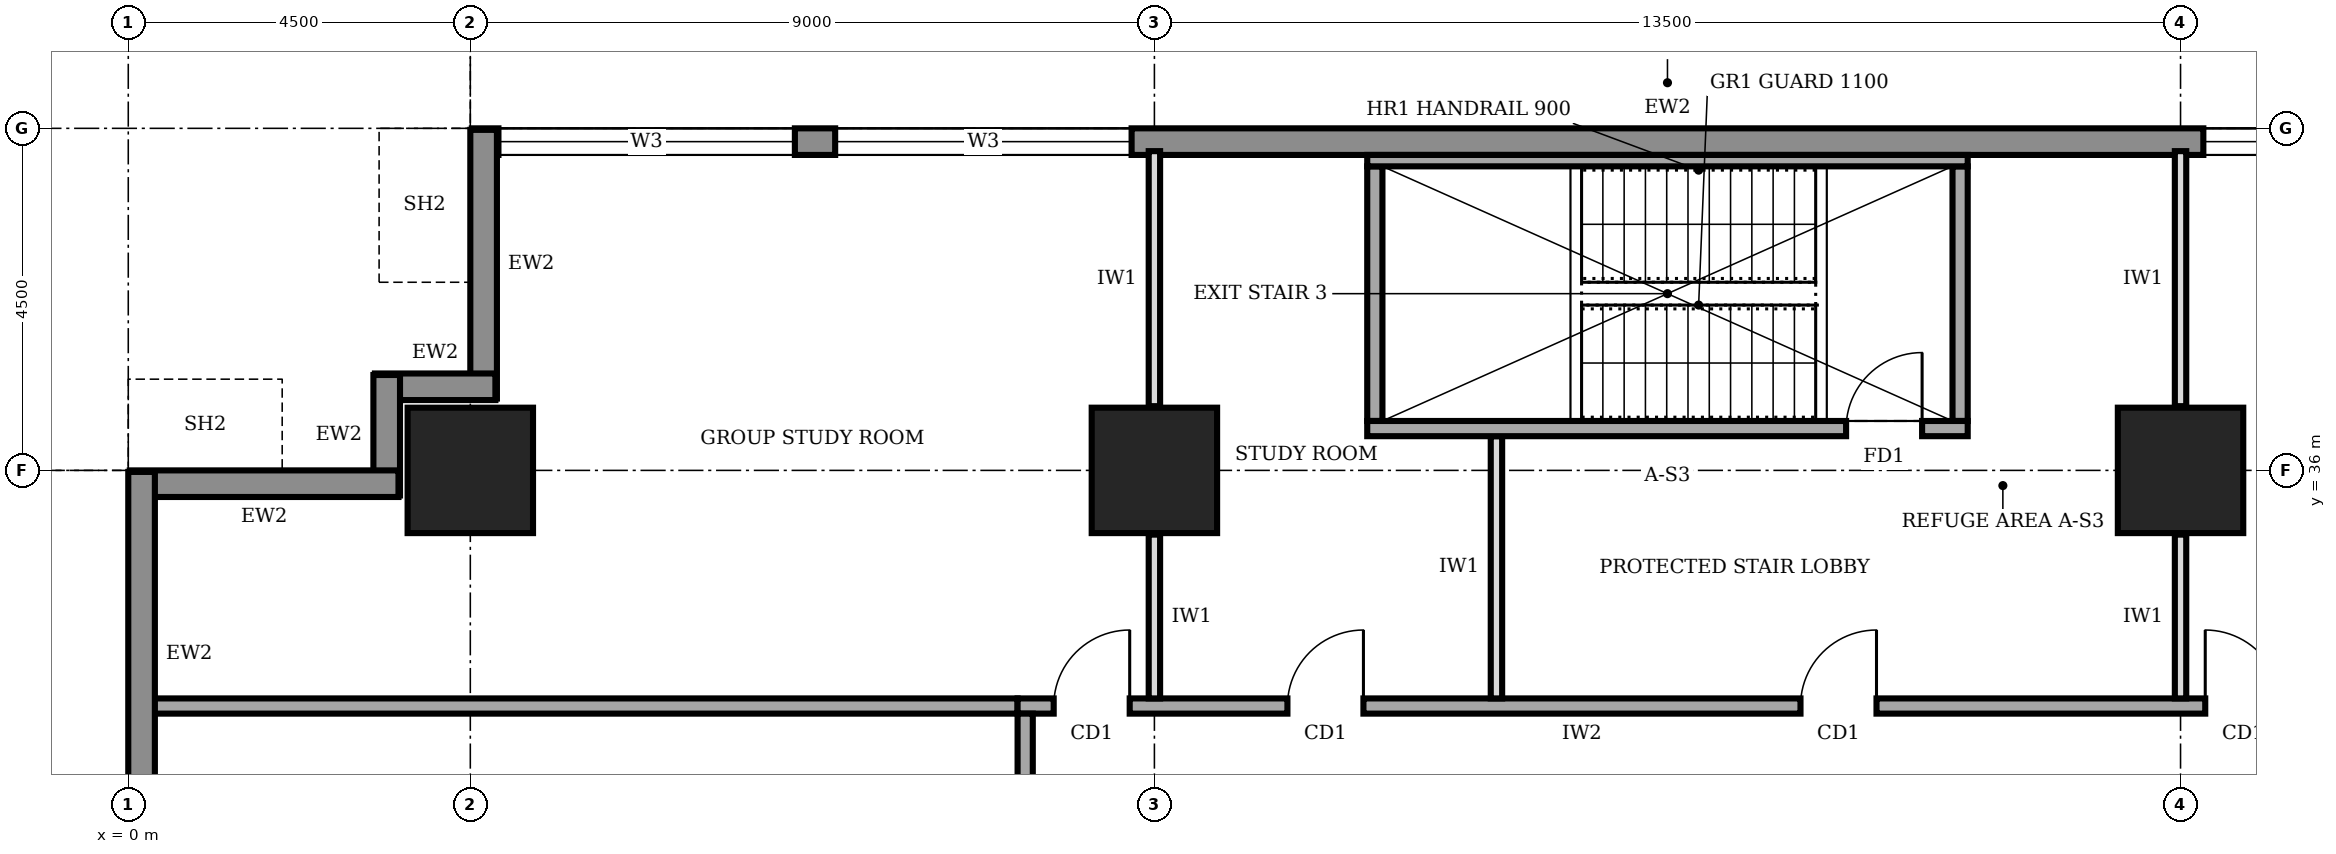
"""IFC4 building model, lengths in metres.
Left out: names, types, materials, properties, quantities, classifications, styles, units other than length and angle.
Written with IfcOpenShell. Run it as: python <this file> out.ifc"""

import sys

from ifc_helpers import new_model, si_unit, direction, frame, frame_2d, origin, origin_2d, place, context, subcontext, project, spatial, rectangle, extrude, element, fill, save


model = new_model("IFC4")
c1 = context("Model", 3, precision=1e-05, world=origin(), true_north=direction((0.0, 1.0)))
c2 = subcontext(c1, "Body", "Model", "MODEL_VIEW")
j1 = project(units=[si_unit("LENGTHUNIT", "METRE"), si_unit("PLANEANGLEUNIT", "RADIAN")], contexts=[c1])
p1 = place(None, origin())
s1 = spatial("IfcSite", under=j1, at=p1, CompositionType="ELEMENT")
p2 = place(p1, origin())
s2 = spatial("IfcBuilding", under=s1, at=p2, CompositionType="ELEMENT")
p3 = place(p2, frame((0.0, 0.0, 189.0)))
s3 = spatial("IfcBuildingStorey", under=s2, at=p3, CompositionType="ELEMENT", Elevation=189.0)
for number, where, z_axis, x_axis in (
    (1, (4.5, 36.0, 0.0), (0.0, 0.0, 1.0), (1.0, 0.0, 0.0)),
    (2, (13.5, 36.0, 0.0), (0.0, 0.0, 1.0), (1.0, 0.0, 0.0)),
    (3, (27.0, 36.0, 0.0), (0.0, 0.0, 1.0), (1.0, 0.0, 0.0)),
):
    element("IfcColumn", number, at=place(p3, frame(where, z_axis=z_axis, x_axis=x_axis)), inside=s3, PredefinedType="COLUMN", context=c2, shape_type="SweptSolid", body=[
        extrude(rectangle(XDim=1.65, YDim=1.65, at=origin_2d()), origin(), (0.0, 0.0, 1.0), 4.0),
    ])
p4 = place(p3, frame((35.98, 40.325, 0.0), z_axis=(0.0, 0.0, 1.0), x_axis=(-1.0, 0.0, 0.0)))
e4 = element("IfcWall", 4, at=p4, inside=s3, PredefinedType="STANDARD", context=c2, shape_type="SweptSolid", body=[
    extrude(rectangle(XDim=31.46, YDim=0.35, at=frame_2d((15.73, 0.0))), origin(), (0.0, 0.0, 1.0), 3.75),
])
p5 = place(p4, frame((27.21, 0.0, 0.95)))
e5 = element("IfcOpeningElement", 5, at=p5, cuts=e4, PredefinedType="OPENING", context=c2, shape_type="SweptSolid", body=[
    extrude(rectangle(XDim=3.9, YDim=1.8, at=frame_2d((1.95, 0.9))), frame((0.0, 0.185, 0.0), z_axis=(0.0, -1.0, 0.0), x_axis=(1.0, 0.0, 0.0)), (0.0, 0.0, 1.0), 0.37),
])
p6 = place(p4, frame((22.78, 0.0, 0.95)))
e6 = element("IfcOpeningElement", 6, at=p6, cuts=e4, PredefinedType="OPENING", context=c2, shape_type="SweptSolid", body=[
    extrude(rectangle(XDim=3.9, YDim=1.8, at=frame_2d((1.95, 0.9))), frame((0.0, 0.185, 0.0), z_axis=(0.0, -1.0, 0.0), x_axis=(1.0, 0.0, 0.0)), (0.0, 0.0, 1.0), 0.37),
])
p7 = place(p4, frame((4.78, 0.0, 0.95)))
e7 = element("IfcOpeningElement", 7, at=p7, cuts=e4, PredefinedType="OPENING", context=c2, shape_type="SweptSolid", body=[
    extrude(rectangle(XDim=3.9, YDim=1.8, at=frame_2d((1.95, 0.9))), frame((0.0, 0.185, 0.0), z_axis=(0.0, -1.0, 0.0), x_axis=(1.0, 0.0, 0.0)), (0.0, 0.0, 1.0), 0.37),
])
p8 = place(p3, frame((4.675, 40.48, 0.0), z_axis=(0.0, 0.0, 1.0), x_axis=(0.0, -1.0, 0.0)))
e8 = element("IfcWall", 8, at=p8, inside=s3, PredefinedType="STANDARD", context=c2, shape_type="SweptSolid", body=[
    extrude(rectangle(XDim=3.535, YDim=0.35, at=frame_2d((1.768, 0.0))), origin(), (0.0, 0.0, 1.0), 2.85),
])
for number, where, z_axis, x_axis in (
    (9, (4.83, 37.1, 0.0), (0.0, 0.0, 1.0), (-1.0, 0.0, 0.0)),
    (10, (3.4, 37.255, 0.0), (0.0, 0.0, 1.0), (0.0, -1.0, 0.0)),
):
    element("IfcWall", number, at=place(p3, frame(where, z_axis=z_axis, x_axis=x_axis)), inside=s3, PredefinedType="STANDARD", context=c2, shape_type="SweptSolid", body=[
        extrude(rectangle(XDim=1.585, YDim=0.35, at=frame_2d((0.792, 0.0))), origin(), (0.0, 0.0, 1.0), 3.75),
    ])
p9 = place(p3, frame((3.555, 35.825, 0.0), z_axis=(0.0, 0.0, 1.0), x_axis=(-1.0, 0.0, 0.0)))
e11 = element("IfcWall", 11, at=p9, inside=s3, PredefinedType="STANDARD", context=c2, shape_type="SweptSolid", body=[
    extrude(rectangle(XDim=3.535, YDim=0.35, at=frame_2d((1.768, 0.0))), origin(), (0.0, 0.0, 1.0), 2.85),
])
p10 = place(p3, frame((0.175, 35.98, 0.0), z_axis=(0.0, 0.0, 1.0), x_axis=(0.0, -1.0, 0.0)))
e12 = element("IfcWall", 12, at=p10, inside=s3, PredefinedType="STANDARD", context=c2, shape_type="SweptSolid", body=[
    extrude(rectangle(XDim=31.46, YDim=0.35, at=frame_2d((15.73, 0.0))), origin(), (0.0, 0.0, 1.0), 3.75),
])
p11 = place(p10, frame((27.21, 0.0, 0.95)))
e13 = element("IfcOpeningElement", 13, at=p11, cuts=e12, PredefinedType="OPENING", context=c2, shape_type="SweptSolid", body=[
    extrude(rectangle(XDim=3.9, YDim=1.8, at=frame_2d((1.95, 0.9))), frame((0.0, 0.185, 0.0), z_axis=(0.0, -1.0, 0.0), x_axis=(1.0, 0.0, 0.0)), (0.0, 0.0, 1.0), 0.37),
])
p12 = place(p10, frame((22.78, 0.0, 0.95)))
e14 = element("IfcOpeningElement", 14, at=p12, cuts=e12, PredefinedType="OPENING", context=c2, shape_type="SweptSolid", body=[
    extrude(rectangle(XDim=3.9, YDim=1.8, at=frame_2d((1.95, 0.9))), frame((0.0, 0.185, 0.0), z_axis=(0.0, -1.0, 0.0), x_axis=(1.0, 0.0, 0.0)), (0.0, 0.0, 1.0), 0.37),
])
p13 = place(p10, frame((18.28, 0.0, 0.95)))
e15 = element("IfcOpeningElement", 15, at=p13, cuts=e12, PredefinedType="OPENING", context=c2, shape_type="SweptSolid", body=[
    extrude(rectangle(XDim=3.9, YDim=1.8, at=frame_2d((1.95, 0.9))), frame((0.0, 0.185, 0.0), z_axis=(0.0, -1.0, 0.0), x_axis=(1.0, 0.0, 0.0)), (0.0, 0.0, 1.0), 0.37),
])
p14 = place(p10, frame((13.78, 0.0, 0.95)))
e16 = element("IfcOpeningElement", 16, at=p14, cuts=e12, PredefinedType="OPENING", context=c2, shape_type="SweptSolid", body=[
    extrude(rectangle(XDim=3.9, YDim=1.8, at=frame_2d((1.95, 0.9))), frame((0.0, 0.185, 0.0), z_axis=(0.0, -1.0, 0.0), x_axis=(1.0, 0.0, 0.0)), (0.0, 0.0, 1.0), 0.37),
])
p15 = place(p10, frame((9.28, 0.0, 0.95)))
e17 = element("IfcOpeningElement", 17, at=p15, cuts=e12, PredefinedType="OPENING", context=c2, shape_type="SweptSolid", body=[
    extrude(rectangle(XDim=3.9, YDim=1.8, at=frame_2d((1.95, 0.9))), frame((0.0, 0.185, 0.0), z_axis=(0.0, -1.0, 0.0), x_axis=(1.0, 0.0, 0.0)), (0.0, 0.0, 1.0), 0.37),
])
p16 = place(p10, frame((4.78, 0.0, 0.95)))
e18 = element("IfcOpeningElement", 18, at=p16, cuts=e12, PredefinedType="OPENING", context=c2, shape_type="SweptSolid", body=[
    extrude(rectangle(XDim=3.9, YDim=1.8, at=frame_2d((1.95, 0.9))), frame((0.0, 0.185, 0.0), z_axis=(0.0, -1.0, 0.0), x_axis=(1.0, 0.0, 0.0)), (0.0, 0.0, 1.0), 0.37),
])
p17 = place(p3, frame((28.6, 32.9, 0.0), z_axis=(0.0, 0.0, 1.0), x_axis=(-1.0, 0.0, 0.0)))
e19 = element("IfcWall", 19, at=p17, inside=s3, PredefinedType="SOLIDWALL", context=c2, shape_type="SweptSolid", body=[
    extrude(rectangle(XDim=16.9, YDim=0.2, at=frame_2d((8.45, 0.0))), origin(), (0.0, 0.0, 1.0), 3.75),
])
p18 = place(p17, frame((15.425, 0.0, 0.0)))
e20 = element("IfcOpeningElement", 20, at=p18, cuts=e19, PredefinedType="OPENING", context=c2, shape_type="SweptSolid", body=[
    extrude(rectangle(XDim=1.0, YDim=2.1, at=frame_2d((0.5, 1.05))), frame((0.0, 0.11, 0.0), z_axis=(0.0, -1.0, 0.0), x_axis=(1.0, 0.0, 0.0)), (0.0, 0.0, 1.0), 0.22),
])
p19 = place(p17, frame((12.35, 0.0, 0.0)))
e21 = element("IfcOpeningElement", 21, at=p19, cuts=e19, PredefinedType="OPENING", context=c2, shape_type="SweptSolid", body=[
    extrude(rectangle(XDim=1.0, YDim=2.1, at=frame_2d((0.5, 1.05))), frame((0.0, 0.11, 0.0), z_axis=(0.0, -1.0, 0.0), x_axis=(1.0, 0.0, 0.0)), (0.0, 0.0, 1.0), 0.22),
])
p20 = place(p17, frame((5.6, 0.0, 0.0)))
e22 = element("IfcOpeningElement", 22, at=p20, cuts=e19, PredefinedType="OPENING", context=c2, shape_type="SweptSolid", body=[
    extrude(rectangle(XDim=1.0, YDim=2.1, at=frame_2d((0.5, 1.05))), frame((0.0, 0.11, 0.0), z_axis=(0.0, -1.0, 0.0), x_axis=(1.0, 0.0, 0.0)), (0.0, 0.0, 1.0), 0.22),
])
p21 = place(p17, frame((0.275, 0.0, 0.0)))
e23 = element("IfcOpeningElement", 23, at=p21, cuts=e19, PredefinedType="OPENING", context=c2, shape_type="SweptSolid", body=[
    extrude(rectangle(XDim=1.0, YDim=2.1, at=frame_2d((0.5, 1.05))), frame((0.0, 0.11, 0.0), z_axis=(0.0, -1.0, 0.0), x_axis=(1.0, 0.0, 0.0)), (0.0, 0.0, 1.0), 0.22),
])
p22 = place(p3, frame((11.8, 32.8, 0.0), z_axis=(0.0, 0.0, 1.0), x_axis=(0.0, -1.0, 0.0)))
e24 = element("IfcWall", 24, at=p22, inside=s3, PredefinedType="SOLIDWALL", context=c2, shape_type="SweptSolid", body=[
    extrude(rectangle(XDim=25.3, YDim=0.2, at=frame_2d((12.65, 0.0))), origin(), (0.0, 0.0, 1.0), 3.75),
])
p23 = place(p22, frame((21.8, 0.0, 0.0)))
e25 = element("IfcOpeningElement", 25, at=p23, cuts=e24, PredefinedType="OPENING", context=c2, shape_type="SweptSolid", body=[
    extrude(rectangle(XDim=1.0, YDim=2.1, at=frame_2d((0.5, 1.05))), frame((0.0, 0.11, 0.0), z_axis=(0.0, -1.0, 0.0), x_axis=(1.0, 0.0, 0.0)), (0.0, 0.0, 1.0), 0.22),
])
p24 = place(p22, frame((17.15, 0.0, 0.0)))
e26 = element("IfcOpeningElement", 26, at=p24, cuts=e24, PredefinedType="OPENING", context=c2, shape_type="SweptSolid", body=[
    extrude(rectangle(XDim=0.9, YDim=2.1, at=frame_2d((0.45, 1.05))), frame((0.0, 0.11, 0.0), z_axis=(0.0, -1.0, 0.0), x_axis=(1.0, 0.0, 0.0)), (0.0, 0.0, 1.0), 0.22),
])
p25 = place(p22, frame((12.35, 0.0, 0.0)))
e27 = element("IfcOpeningElement", 27, at=p25, cuts=e24, PredefinedType="OPENING", context=c2, shape_type="SweptSolid", body=[
    extrude(rectangle(XDim=0.9, YDim=2.1, at=frame_2d((0.45, 1.05))), frame((0.0, 0.11, 0.0), z_axis=(0.0, -1.0, 0.0), x_axis=(1.0, 0.0, 0.0)), (0.0, 0.0, 1.0), 0.22),
])
p26 = place(p22, frame((9.3, 0.0, 0.0)))
e28 = element("IfcOpeningElement", 28, at=p26, cuts=e24, PredefinedType="OPENING", context=c2, shape_type="SweptSolid", body=[
    extrude(rectangle(XDim=0.9, YDim=2.1, at=frame_2d((0.45, 1.05))), frame((0.0, 0.11, 0.0), z_axis=(0.0, -1.0, 0.0), x_axis=(1.0, 0.0, 0.0)), (0.0, 0.0, 1.0), 0.22),
])
p27 = place(p22, frame((6.3, 0.0, 0.0)))
e29 = element("IfcOpeningElement", 29, at=p27, cuts=e24, PredefinedType="OPENING", context=c2, shape_type="SweptSolid", body=[
    extrude(rectangle(XDim=1.0, YDim=2.1, at=frame_2d((0.5, 1.05))), frame((0.0, 0.11, 0.0), z_axis=(0.0, -1.0, 0.0), x_axis=(1.0, 0.0, 0.0)), (0.0, 0.0, 1.0), 0.22),
])
p28 = place(p22, frame((14.4, 0.0, 0.0)))
e30 = element("IfcOpeningElement", 30, at=p28, cuts=e24, PredefinedType="OPENING", context=c2, shape_type="SweptSolid", body=[
    extrude(rectangle(XDim=1.0, YDim=2.1, at=frame_2d((0.5, 1.05))), frame((0.0, 0.11, 0.0), z_axis=(0.0, -1.0, 0.0), x_axis=(1.0, 0.0, 0.0)), (0.0, 0.0, 1.0), 0.22),
])
p29 = place(p22, frame((2.3, 0.0, 0.0)))
e31 = element("IfcOpeningElement", 31, at=p29, cuts=e24, PredefinedType="OPENING", context=c2, shape_type="SweptSolid", body=[
    extrude(rectangle(XDim=1.0, YDim=2.1, at=frame_2d((0.5, 1.05))), frame((0.0, 0.11, 0.0), z_axis=(0.0, -1.0, 0.0), x_axis=(1.0, 0.0, 0.0)), (0.0, 0.0, 1.0), 0.22),
])
p30 = place(p3, frame((0.3, 32.9, 0.0), z_axis=(0.0, 0.0, 1.0), x_axis=(1.0, 0.0, 0.0)))
e32 = element("IfcWall", 32, at=p30, inside=s3, PredefinedType="SOLIDWALL", context=c2, shape_type="SweptSolid", body=[
    extrude(rectangle(XDim=11.4, YDim=0.2, at=frame_2d((5.7, 0.0))), origin(), (0.0, 0.0, 1.0), 3.75),
])
p31 = place(p3, frame((13.5, 33.0, 0.0), z_axis=(0.0, 0.0, 1.0), x_axis=(0.0, 1.0, 0.0)))
e33 = element("IfcWall", 33, at=p31, inside=s3, PredefinedType="PARTITIONING", context=c2, shape_type="SweptSolid", body=[
    extrude(rectangle(XDim=2.155, YDim=0.15, at=frame_2d((1.078, 0.0))), origin(), (0.0, 0.0, 1.0), 2.85),
])
p32 = place(p3, frame((13.5, 36.845, 0.0), z_axis=(0.0, 0.0, 1.0), x_axis=(0.0, 1.0, 0.0)))
e34 = element("IfcWall", 34, at=p32, inside=s3, PredefinedType="PARTITIONING", context=c2, shape_type="SweptSolid", body=[
    extrude(rectangle(XDim=3.355, YDim=0.15, at=frame_2d((1.677, 0.0))), origin(), (0.0, 0.0, 1.0), 2.85),
])
p33 = place(p3, frame((18.0, 33.0, 0.0), z_axis=(0.0, 0.0, 1.0), x_axis=(0.0, 1.0, 0.0)))
e35 = element("IfcWall", 35, at=p33, inside=s3, PredefinedType="PARTITIONING", context=c2, shape_type="SweptSolid", body=[
    extrude(rectangle(XDim=3.45, YDim=0.15, at=frame_2d((1.725, 0.0))), origin(), (0.0, 0.0, 1.0), 3.75),
])
p34 = place(p3, frame((27.0, 33.0, 0.0), z_axis=(0.0, 0.0, 1.0), x_axis=(0.0, 1.0, 0.0)))
e36 = element("IfcWall", 36, at=p34, inside=s3, PredefinedType="PARTITIONING", context=c2, shape_type="SweptSolid", body=[
    extrude(rectangle(XDim=2.155, YDim=0.15, at=frame_2d((1.078, 0.0))), origin(), (0.0, 0.0, 1.0), 2.85),
])
p35 = place(p3, frame((27.0, 36.845, 0.0), z_axis=(0.0, 0.0, 1.0), x_axis=(0.0, 1.0, 0.0)))
e37 = element("IfcWall", 37, at=p35, inside=s3, PredefinedType="PARTITIONING", context=c2, shape_type="SweptSolid", body=[
    extrude(rectangle(XDim=3.355, YDim=0.15, at=frame_2d((1.677, 0.0))), origin(), (0.0, 0.0, 1.0), 2.85),
])
p36 = place(p3, frame((16.3, 36.55, 0.0), z_axis=(0.0, 0.0, 1.0), x_axis=(1.0, 0.0, 0.0)))
e38 = element("IfcWall", 38, at=p36, inside=s3, PredefinedType="SOLIDWALL", context=c2, shape_type="SweptSolid", body=[
    extrude(rectangle(XDim=7.9, YDim=0.2, at=frame_2d((3.95, 0.0))), origin(), (0.0, 0.0, 1.0), 3.75),
])
p37 = place(p36, frame((6.3, 0.0, 0.0)))
e39 = element("IfcOpeningElement", 39, at=p37, cuts=e38, PredefinedType="OPENING", context=c2, shape_type="SweptSolid", body=[
    extrude(rectangle(XDim=1.0, YDim=2.1, at=frame_2d((0.5, 1.05))), frame((0.0, 0.11, 0.0), z_axis=(0.0, -1.0, 0.0), x_axis=(1.0, 0.0, 0.0)), (0.0, 0.0, 1.0), 0.22),
])
p38 = place(p3, frame((16.3, 40.075, 0.0), z_axis=(0.0, 0.0, 1.0), x_axis=(1.0, 0.0, 0.0)))
e40 = element("IfcWall", 40, at=p38, inside=s3, PredefinedType="SOLIDWALL", context=c2, shape_type="SweptSolid", body=[
    extrude(rectangle(XDim=7.9, YDim=0.15, at=frame_2d((3.95, 0.0))), origin(), (0.0, 0.0, 1.0), 3.75),
])
for number, where, z_axis, x_axis in (
    (41, (16.4, 36.65, 0.0), (0.0, 0.0, 1.0), (0.0, 1.0, 0.0)),
    (42, (24.1, 36.65, 0.0), (0.0, 0.0, 1.0), (0.0, 1.0, 0.0)),
):
    element("IfcWall", number, at=place(p3, frame(where, z_axis=z_axis, x_axis=x_axis)), inside=s3, PredefinedType="SOLIDWALL", context=c2, shape_type="SweptSolid", body=[
        extrude(rectangle(XDim=3.35, YDim=0.2, at=frame_2d((1.675, 0.0))), origin(), (0.0, 0.0, 1.0), 3.75),
    ])
p39 = place(p5, origin())
e43 = element("IfcWindow", 43, at=p39, inside=s3, PartitioningType="SINGLE_PANEL", PredefinedType="WINDOW", context=c2, shape_type="SweptSolid", body=[
    extrude(rectangle(XDim=3.9, YDim=1.8, at=frame_2d((1.95, 0.9))), frame((0.0, 0.03, 0.0), z_axis=(0.0, -1.0, 0.0), x_axis=(1.0, 0.0, 0.0)), (0.0, 0.0, 1.0), 0.06),
])
fill(e5, e43)
p40 = place(p6, origin())
e44 = element("IfcWindow", 44, at=p40, inside=s3, PartitioningType="SINGLE_PANEL", PredefinedType="WINDOW", context=c2, shape_type="SweptSolid", body=[
    extrude(rectangle(XDim=3.9, YDim=1.8, at=frame_2d((1.95, 0.9))), frame((0.0, 0.03, 0.0), z_axis=(0.0, -1.0, 0.0), x_axis=(1.0, 0.0, 0.0)), (0.0, 0.0, 1.0), 0.06),
])
fill(e6, e44)
p41 = place(p7, origin())
e45 = element("IfcWindow", 45, at=p41, inside=s3, PartitioningType="SINGLE_PANEL", PredefinedType="WINDOW", context=c2, shape_type="SweptSolid", body=[
    extrude(rectangle(XDim=3.9, YDim=1.8, at=frame_2d((1.95, 0.9))), frame((0.0, 0.03, 0.0), z_axis=(0.0, -1.0, 0.0), x_axis=(1.0, 0.0, 0.0)), (0.0, 0.0, 1.0), 0.06),
])
fill(e7, e45)
p42 = place(p18, frame((1.0, 0.0, 0.0), z_axis=(0.0, 0.0, 1.0), x_axis=(-1.0, 0.0, 0.0)))
e46 = element("IfcDoor", 46, at=p42, inside=s3, OperationType="SINGLE_SWING_RIGHT", PredefinedType="DOOR", context=c2, shape_type="SweptSolid", body=[
    extrude(rectangle(XDim=1.0, YDim=2.1, at=frame_2d((0.5, 1.05))), frame((0.0, 0.025, 0.0), z_axis=(0.0, -1.0, 0.0), x_axis=(1.0, 0.0, 0.0)), (0.0, 0.0, 1.0), 0.05),
])
fill(e20, e46)
p43 = place(p19, frame((1.0, 0.0, 0.0), z_axis=(0.0, 0.0, 1.0), x_axis=(-1.0, 0.0, 0.0)))
e47 = element("IfcDoor", 47, at=p43, inside=s3, OperationType="SINGLE_SWING_RIGHT", PredefinedType="DOOR", context=c2, shape_type="SweptSolid", body=[
    extrude(rectangle(XDim=1.0, YDim=2.1, at=frame_2d((0.5, 1.05))), frame((0.0, 0.025, 0.0), z_axis=(0.0, -1.0, 0.0), x_axis=(1.0, 0.0, 0.0)), (0.0, 0.0, 1.0), 0.05),
])
fill(e21, e47)
p44 = place(p20, frame((1.0, 0.0, 0.0), z_axis=(0.0, 0.0, 1.0), x_axis=(-1.0, 0.0, 0.0)))
e48 = element("IfcDoor", 48, at=p44, inside=s3, OperationType="SINGLE_SWING_RIGHT", PredefinedType="DOOR", context=c2, shape_type="SweptSolid", body=[
    extrude(rectangle(XDim=1.0, YDim=2.1, at=frame_2d((0.5, 1.05))), frame((0.0, 0.025, 0.0), z_axis=(0.0, -1.0, 0.0), x_axis=(1.0, 0.0, 0.0)), (0.0, 0.0, 1.0), 0.05),
])
fill(e22, e48)
p45 = place(p21, frame((1.0, 0.0, 0.0), z_axis=(0.0, 0.0, 1.0), x_axis=(-1.0, 0.0, 0.0)))
e49 = element("IfcDoor", 49, at=p45, inside=s3, OperationType="SINGLE_SWING_LEFT", PredefinedType="DOOR", context=c2, shape_type="SweptSolid", body=[
    extrude(rectangle(XDim=1.0, YDim=2.1, at=frame_2d((0.5, 1.05))), frame((0.0, 0.025, 0.0), z_axis=(0.0, -1.0, 0.0), x_axis=(1.0, 0.0, 0.0)), (0.0, 0.0, 1.0), 0.05),
])
fill(e23, e49)
p46 = place(p37, origin())
e50 = element("IfcDoor", 50, at=p46, inside=s3, OperationType="SINGLE_SWING_RIGHT", PredefinedType="DOOR", context=c2, shape_type="SweptSolid", body=[
    extrude(rectangle(XDim=1.0, YDim=2.1, at=frame_2d((0.5, 1.05))), frame((0.0, 0.025, 0.0), z_axis=(0.0, -1.0, 0.0), x_axis=(1.0, 0.0, 0.0)), (0.0, 0.0, 1.0), 0.05),
])
fill(e39, e50)
save(model, sys.argv[1])
